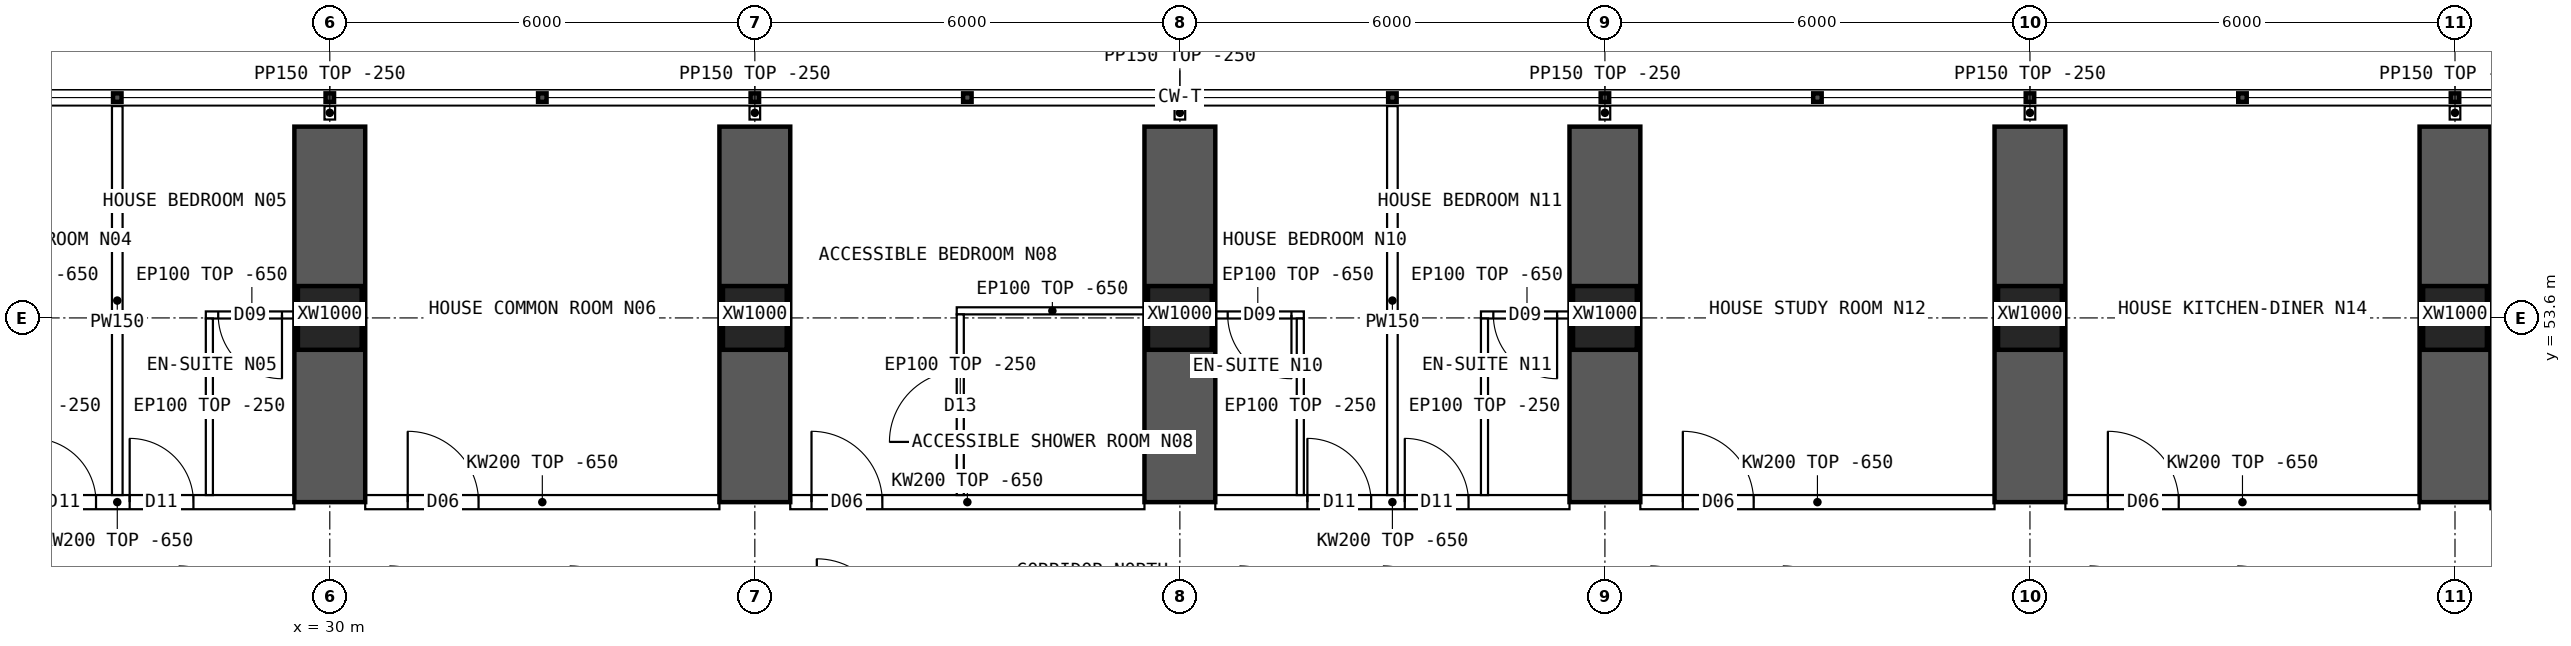
"""IFC4 building model, lengths in metres.
Left out: names, types, materials, properties, quantities, classifications, styles, units other than length and angle.
Written with IfcOpenShell. Run it as: python <this file> out.ifc"""

import sys

from ifc_helpers import new_model, si_unit, direction, frame, frame_2d, origin, origin_2d, place, context, subcontext, project, spatial, polyline, rectangle, hollow_rectangle, outline, extrude, element, fill, save


model = new_model("IFC4")
c1 = context("Model", 3, precision=1e-05, world=origin(), true_north=direction((0.0, 1.0)))
c2 = subcontext(c1, "Body", "Model", "MODEL_VIEW")
j1 = project(units=[si_unit("LENGTHUNIT", "METRE"), si_unit("PLANEANGLEUNIT", "RADIAN")], contexts=[c1])
p1 = place(None, origin())
s1 = spatial("IfcSite", under=j1, at=p1, CompositionType="ELEMENT")
p2 = place(p1, origin())
s2 = spatial("IfcBuilding", under=s1, at=p2, CompositionType="ELEMENT")
p3 = place(p2, frame((0.0, 0.0, 61.45)))
s3 = spatial("IfcBuildingStorey", under=s2, at=p3, CompositionType="ELEMENT", Elevation=61.45)
for number, where, z_axis, x_axis in (
    (1, (30.0, 53.6, 0.0), (0.0, 0.0, 1.0), (1.0, 0.0, 0.0)),
    (2, (36.0, 53.6, 0.0), (0.0, 0.0, 1.0), (1.0, 0.0, 0.0)),
    (3, (42.0, 53.6, 0.0), (0.0, 0.0, 1.0), (1.0, 0.0, 0.0)),
    (4, (48.0, 53.6, 0.0), (0.0, 0.0, 1.0), (1.0, 0.0, 0.0)),
    (5, (54.0, 53.6, 0.0), (0.0, 0.0, 1.0), (1.0, 0.0, 0.0)),
    (6, (60.0, 53.6, 0.0), (0.0, 0.0, 1.0), (1.0, 0.0, 0.0)),
):
    element("IfcColumn", number, at=place(p3, frame(where, z_axis=z_axis, x_axis=x_axis)), inside=s3, PredefinedType="COLUMN", context=c2, shape_type="SweptSolid", body=[
        extrude(hollow_rectangle(XDim=0.9, YDim=0.9, WallThickness=0.09, at=origin_2d()), origin(), (0.0, 0.0, 1.0), 3.75),
    ])
for number, where, z_axis, x_axis in (
    (7, (30.0, 51.0, 0.0), (0.0, 0.0, 1.0), (0.0, 1.0, 0.0)),
    (8, (36.0, 51.0, 0.0), (0.0, 0.0, 1.0), (0.0, 1.0, 0.0)),
    (9, (42.0, 51.0, 0.0), (0.0, 0.0, 1.0), (0.0, 1.0, 0.0)),
    (10, (48.0, 51.0, 0.0), (0.0, 0.0, 1.0), (0.0, 1.0, 0.0)),
    (11, (54.0, 51.0, 0.0), (0.0, 0.0, 1.0), (0.0, 1.0, 0.0)),
    (12, (60.0, 51.0, 0.0), (0.0, 0.0, 1.0), (0.0, 1.0, 0.0)),
):
    element("IfcWall", number, at=place(p3, frame(where, z_axis=z_axis, x_axis=x_axis)), inside=s3, PredefinedType="SHEAR", context=c2, shape_type="SweptSolid", body=[
        extrude(rectangle(XDim=5.3, YDim=1.0, at=frame_2d((2.65, 0.0))), origin(), (0.0, 0.0, 1.0), 3.75),
    ])
p4 = place(p3, frame((24.5, 51.0, 0.0), z_axis=(0.0, 0.0, 1.0), x_axis=(1.0, 0.0, 0.0)))
e13 = element("IfcWall", 13, at=p4, inside=s3, PredefinedType="SOLIDWALL", context=c2, shape_type="SweptSolid", body=[
    extrude(outline(polyline([(0.0, 0.0), (5.0, 0.0), (5.0, 3.1), (0.0, 3.1), (0.0, 0.0)])), frame((0.0, 0.1, 0.0), z_axis=(0.0, -1.0, 0.0), x_axis=(1.0, 0.0, 0.0)), (0.0, 0.0, 1.0), 0.2),
])
p5 = place(p4, frame((1.3, 0.0, 0.0)))
e14 = element("IfcOpeningElement", 14, at=p5, cuts=e13, PredefinedType="OPENING", context=c2, shape_type="SweptSolid", body=[
    extrude(rectangle(XDim=0.9, YDim=2.1, at=frame_2d((0.45, 1.05))), frame((0.0, 0.11, 0.0), z_axis=(0.0, -1.0, 0.0), x_axis=(1.0, 0.0, 0.0)), (0.0, 0.0, 1.0), 0.22),
])
p6 = place(p4, frame((2.675, 0.0, 0.0)))
e15 = element("IfcOpeningElement", 15, at=p6, cuts=e13, PredefinedType="OPENING", context=c2, shape_type="SweptSolid", body=[
    extrude(rectangle(XDim=0.9, YDim=2.1, at=frame_2d((0.45, 1.05))), frame((0.0, 0.11, 0.0), z_axis=(0.0, -1.0, 0.0), x_axis=(1.0, 0.0, 0.0)), (0.0, 0.0, 1.0), 0.22),
])
p7 = place(p3, frame((30.5, 51.0, 0.0), z_axis=(0.0, 0.0, 1.0), x_axis=(1.0, 0.0, 0.0)))
e16 = element("IfcWall", 16, at=p7, inside=s3, PredefinedType="SOLIDWALL", context=c2, shape_type="SweptSolid", body=[
    extrude(outline(polyline([(0.0, 0.0), (5.0, 0.0), (5.0, 3.1), (0.0, 3.1), (0.0, 0.0)])), frame((0.0, 0.1, 0.0), z_axis=(0.0, -1.0, 0.0), x_axis=(1.0, 0.0, 0.0)), (0.0, 0.0, 1.0), 0.2),
])
p8 = place(p7, frame((0.6, 0.0, 0.0)))
e17 = element("IfcOpeningElement", 17, at=p8, cuts=e16, PredefinedType="OPENING", context=c2, shape_type="SweptSolid", body=[
    extrude(rectangle(XDim=1.0, YDim=2.1, at=frame_2d((0.5, 1.05))), frame((0.0, 0.11, 0.0), z_axis=(0.0, -1.0, 0.0), x_axis=(1.0, 0.0, 0.0)), (0.0, 0.0, 1.0), 0.22),
])
p9 = place(p3, frame((36.5, 51.0, 0.0), z_axis=(0.0, 0.0, 1.0), x_axis=(1.0, 0.0, 0.0)))
e18 = element("IfcWall", 18, at=p9, inside=s3, PredefinedType="SOLIDWALL", context=c2, shape_type="SweptSolid", body=[
    extrude(outline(polyline([(0.0, 0.0), (5.0, 0.0), (5.0, 3.1), (0.0, 3.1), (0.0, 0.0)])), frame((0.0, 0.1, 0.0), z_axis=(0.0, -1.0, 0.0), x_axis=(1.0, 0.0, 0.0)), (0.0, 0.0, 1.0), 0.2),
])
p10 = place(p9, frame((0.3, 0.0, 0.0)))
e19 = element("IfcOpeningElement", 19, at=p10, cuts=e18, PredefinedType="OPENING", context=c2, shape_type="SweptSolid", body=[
    extrude(rectangle(XDim=1.0, YDim=2.1, at=frame_2d((0.5, 1.05))), frame((0.0, 0.11, 0.0), z_axis=(0.0, -1.0, 0.0), x_axis=(1.0, 0.0, 0.0)), (0.0, 0.0, 1.0), 0.22),
])
p11 = place(p3, frame((42.5, 51.0, 0.0), z_axis=(0.0, 0.0, 1.0), x_axis=(1.0, 0.0, 0.0)))
e20 = element("IfcWall", 20, at=p11, inside=s3, PredefinedType="SOLIDWALL", context=c2, shape_type="SweptSolid", body=[
    extrude(outline(polyline([(0.0, 0.0), (5.0, 0.0), (5.0, 3.1), (0.0, 3.1), (0.0, 0.0)])), frame((0.0, 0.1, 0.0), z_axis=(0.0, -1.0, 0.0), x_axis=(1.0, 0.0, 0.0)), (0.0, 0.0, 1.0), 0.2),
])
p12 = place(p11, frame((1.3, 0.0, 0.0)))
e21 = element("IfcOpeningElement", 21, at=p12, cuts=e20, PredefinedType="OPENING", context=c2, shape_type="SweptSolid", body=[
    extrude(rectangle(XDim=0.9, YDim=2.1, at=frame_2d((0.45, 1.05))), frame((0.0, 0.11, 0.0), z_axis=(0.0, -1.0, 0.0), x_axis=(1.0, 0.0, 0.0)), (0.0, 0.0, 1.0), 0.22),
])
p13 = place(p11, frame((2.675, 0.0, 0.0)))
e22 = element("IfcOpeningElement", 22, at=p13, cuts=e20, PredefinedType="OPENING", context=c2, shape_type="SweptSolid", body=[
    extrude(rectangle(XDim=0.9, YDim=2.1, at=frame_2d((0.45, 1.05))), frame((0.0, 0.11, 0.0), z_axis=(0.0, -1.0, 0.0), x_axis=(1.0, 0.0, 0.0)), (0.0, 0.0, 1.0), 0.22),
])
p14 = place(p3, frame((48.5, 51.0, 0.0), z_axis=(0.0, 0.0, 1.0), x_axis=(1.0, 0.0, 0.0)))
e23 = element("IfcWall", 23, at=p14, inside=s3, PredefinedType="SOLIDWALL", context=c2, shape_type="SweptSolid", body=[
    extrude(outline(polyline([(0.0, 0.0), (5.0, 0.0), (5.0, 3.1), (0.0, 3.1), (0.0, 0.0)])), frame((0.0, 0.1, 0.0), z_axis=(0.0, -1.0, 0.0), x_axis=(1.0, 0.0, 0.0)), (0.0, 0.0, 1.0), 0.2),
])
p15 = place(p14, frame((0.6, 0.0, 0.0)))
e24 = element("IfcOpeningElement", 24, at=p15, cuts=e23, PredefinedType="OPENING", context=c2, shape_type="SweptSolid", body=[
    extrude(rectangle(XDim=1.0, YDim=2.1, at=frame_2d((0.5, 1.05))), frame((0.0, 0.11, 0.0), z_axis=(0.0, -1.0, 0.0), x_axis=(1.0, 0.0, 0.0)), (0.0, 0.0, 1.0), 0.22),
])
p16 = place(p3, frame((54.5, 51.0, 0.0), z_axis=(0.0, 0.0, 1.0), x_axis=(1.0, 0.0, 0.0)))
e25 = element("IfcWall", 25, at=p16, inside=s3, PredefinedType="SOLIDWALL", context=c2, shape_type="SweptSolid", body=[
    extrude(outline(polyline([(0.0, 0.0), (5.0, 0.0), (5.0, 3.1), (0.0, 3.1), (0.0, 0.0)])), frame((0.0, 0.1, 0.0), z_axis=(0.0, -1.0, 0.0), x_axis=(1.0, 0.0, 0.0)), (0.0, 0.0, 1.0), 0.2),
])
p17 = place(p16, frame((0.6, 0.0, 0.0)))
e26 = element("IfcOpeningElement", 26, at=p17, cuts=e25, PredefinedType="OPENING", context=c2, shape_type="SweptSolid", body=[
    extrude(rectangle(XDim=1.0, YDim=2.1, at=frame_2d((0.5, 1.05))), frame((0.0, 0.11, 0.0), z_axis=(0.0, -1.0, 0.0), x_axis=(1.0, 0.0, 0.0)), (0.0, 0.0, 1.0), 0.22),
])
p18 = place(p3, frame((27.0, 56.59, 0.0), z_axis=(0.0, 0.0, 1.0), x_axis=(0.0, -1.0, 0.0)))
e27 = element("IfcWall", 27, at=p18, inside=s3, PredefinedType="PARTITIONING", context=c2, shape_type="SweptSolid", body=[
    extrude(outline(polyline([(0.0, 0.0), (5.49, 0.0), (5.49, 3.1), (5.442, 3.1), (5.44, 3.5), (3.192, 3.5), (3.19, 3.1), (2.792, 3.1), (2.79, 3.5), (0.0, 3.5), (0.0, 0.0)])), frame((0.0, 0.075, 0.0), z_axis=(0.0, -1.0, 0.0), x_axis=(1.0, 0.0, 0.0)), (0.0, 0.0, 1.0), 0.15),
])
p19 = place(p3, frame((28.25, 53.642, 0.0), z_axis=(0.0, 0.0, 1.0), x_axis=(1.0, 0.0, 0.0)))
e28 = element("IfcWall", 28, at=p19, inside=s3, PredefinedType="PARTITIONING", context=c2, shape_type="SweptSolid", body=[
    extrude(outline(polyline([(0.0, 0.0), (1.3, 0.0), (1.3, 3.1), (0.0, 3.1), (0.0, 0.0)])), frame((0.0, 0.05, 0.0), z_axis=(0.0, -1.0, 0.0), x_axis=(1.0, 0.0, 0.0)), (0.0, 0.0, 1.0), 0.1),
])
p20 = place(p19, frame((0.175, 0.0, 0.0)))
e29 = element("IfcOpeningElement", 29, at=p20, cuts=e28, PredefinedType="OPENING", context=c2, shape_type="SweptSolid", body=[
    extrude(rectangle(XDim=0.9, YDim=2.1, at=frame_2d((0.45, 1.05))), frame((0.0, 0.06, 0.0), z_axis=(0.0, -1.0, 0.0), x_axis=(1.0, 0.0, 0.0)), (0.0, 0.0, 1.0), 0.12),
])
p21 = place(p3, frame((28.3, 53.592, 0.0), z_axis=(0.0, 0.0, 1.0), x_axis=(0.0, -1.0, 0.0)))
e30 = element("IfcWall", 30, at=p21, inside=s3, PredefinedType="PARTITIONING", context=c2, shape_type="SweptSolid", body=[
    extrude(outline(polyline([(0.0, 0.0), (2.492, 0.0), (2.492, 3.1), (2.444, 3.1), (2.442, 3.5), (0.194, 3.5), (0.192, 3.1), (0.0, 3.1), (0.0, 0.0)])), frame((0.0, 0.05, 0.0), z_axis=(0.0, -1.0, 0.0), x_axis=(1.0, 0.0, 0.0)), (0.0, 0.0, 1.0), 0.1),
])
p22 = place(p3, frame((38.85, 53.7, 0.0), z_axis=(0.0, 0.0, 1.0), x_axis=(1.0, 0.0, 0.0)))
e31 = element("IfcWall", 31, at=p22, inside=s3, PredefinedType="PARTITIONING", context=c2, shape_type="SweptSolid", body=[
    extrude(outline(polyline([(0.0, 0.0), (2.7, 0.0), (2.7, 3.1), (0.0, 3.1), (0.0, 0.0)])), frame((0.0, 0.05, 0.0), z_axis=(0.0, -1.0, 0.0), x_axis=(1.0, 0.0, 0.0)), (0.0, 0.0, 1.0), 0.1),
])
p23 = place(p3, frame((38.9, 53.65, 0.0), z_axis=(0.0, 0.0, 1.0), x_axis=(0.0, -1.0, 0.0)))
e32 = element("IfcWall", 32, at=p23, inside=s3, PredefinedType="PARTITIONING", context=c2, shape_type="SweptSolid", body=[
    extrude(outline(polyline([(0.0, 0.0), (2.55, 0.0), (2.55, 3.1), (2.502, 3.1), (2.5, 3.5), (0.252, 3.5), (0.25, 3.1), (0.0, 3.1), (0.0, 0.0)])), frame((0.0, 0.05, 0.0), z_axis=(0.0, -1.0, 0.0), x_axis=(1.0, 0.0, 0.0)), (0.0, 0.0, 1.0), 0.1),
])
p24 = place(p23, frame((0.8, 0.0, 0.0)))
e33 = element("IfcOpeningElement", 33, at=p24, cuts=e32, PredefinedType="OPENING", context=c2, shape_type="SweptSolid", body=[
    extrude(rectangle(XDim=1.0, YDim=2.1, at=frame_2d((0.5, 1.05))), frame((0.0, 0.06, 0.0), z_axis=(0.0, -1.0, 0.0), x_axis=(1.0, 0.0, 0.0)), (0.0, 0.0, 1.0), 0.12),
])
p25 = place(p3, frame((45.0, 56.59, 0.0), z_axis=(0.0, 0.0, 1.0), x_axis=(0.0, -1.0, 0.0)))
e34 = element("IfcWall", 34, at=p25, inside=s3, PredefinedType="PARTITIONING", context=c2, shape_type="SweptSolid", body=[
    extrude(outline(polyline([(0.0, 0.0), (5.49, 0.0), (5.49, 3.1), (5.442, 3.1), (5.44, 3.5), (3.192, 3.5), (3.19, 3.1), (2.792, 3.1), (2.79, 3.5), (0.0, 3.5), (0.0, 0.0)])), frame((0.0, 0.075, 0.0), z_axis=(0.0, -1.0, 0.0), x_axis=(1.0, 0.0, 0.0)), (0.0, 0.0, 1.0), 0.15),
])
p26 = place(p3, frame((42.45, 53.642, 0.0), z_axis=(0.0, 0.0, 1.0), x_axis=(1.0, 0.0, 0.0)))
e35 = element("IfcWall", 35, at=p26, inside=s3, PredefinedType="PARTITIONING", context=c2, shape_type="SweptSolid", body=[
    extrude(outline(polyline([(0.0, 0.0), (1.3, 0.0), (1.3, 3.1), (0.0, 3.1), (0.0, 0.0)])), frame((0.0, 0.05, 0.0), z_axis=(0.0, -1.0, 0.0), x_axis=(1.0, 0.0, 0.0)), (0.0, 0.0, 1.0), 0.1),
])
p27 = place(p26, frame((0.225, 0.0, 0.0)))
e36 = element("IfcOpeningElement", 36, at=p27, cuts=e35, PredefinedType="OPENING", context=c2, shape_type="SweptSolid", body=[
    extrude(rectangle(XDim=0.9, YDim=2.1, at=frame_2d((0.45, 1.05))), frame((0.0, 0.06, 0.0), z_axis=(0.0, -1.0, 0.0), x_axis=(1.0, 0.0, 0.0)), (0.0, 0.0, 1.0), 0.12),
])
p28 = place(p3, frame((43.7, 53.592, 0.0), z_axis=(0.0, 0.0, 1.0), x_axis=(0.0, -1.0, 0.0)))
e37 = element("IfcWall", 37, at=p28, inside=s3, PredefinedType="PARTITIONING", context=c2, shape_type="SweptSolid", body=[
    extrude(outline(polyline([(0.0, 0.0), (2.492, 0.0), (2.492, 3.1), (2.444, 3.1), (2.442, 3.5), (0.194, 3.5), (0.192, 3.1), (0.0, 3.1), (0.0, 0.0)])), frame((0.0, 0.05, 0.0), z_axis=(0.0, -1.0, 0.0), x_axis=(1.0, 0.0, 0.0)), (0.0, 0.0, 1.0), 0.1),
])
p29 = place(p3, frame((46.25, 53.642, 0.0), z_axis=(0.0, 0.0, 1.0), x_axis=(1.0, 0.0, 0.0)))
e38 = element("IfcWall", 38, at=p29, inside=s3, PredefinedType="PARTITIONING", context=c2, shape_type="SweptSolid", body=[
    extrude(outline(polyline([(0.0, 0.0), (1.3, 0.0), (1.3, 3.1), (0.0, 3.1), (0.0, 0.0)])), frame((0.0, 0.05, 0.0), z_axis=(0.0, -1.0, 0.0), x_axis=(1.0, 0.0, 0.0)), (0.0, 0.0, 1.0), 0.1),
])
p30 = place(p29, frame((0.175, 0.0, 0.0)))
e39 = element("IfcOpeningElement", 39, at=p30, cuts=e38, PredefinedType="OPENING", context=c2, shape_type="SweptSolid", body=[
    extrude(rectangle(XDim=0.9, YDim=2.1, at=frame_2d((0.45, 1.05))), frame((0.0, 0.06, 0.0), z_axis=(0.0, -1.0, 0.0), x_axis=(1.0, 0.0, 0.0)), (0.0, 0.0, 1.0), 0.12),
])
p31 = place(p3, frame((46.3, 53.592, 0.0), z_axis=(0.0, 0.0, 1.0), x_axis=(0.0, -1.0, 0.0)))
e40 = element("IfcWall", 40, at=p31, inside=s3, PredefinedType="PARTITIONING", context=c2, shape_type="SweptSolid", body=[
    extrude(outline(polyline([(0.0, 0.0), (2.492, 0.0), (2.492, 3.1), (2.444, 3.1), (2.442, 3.5), (0.194, 3.5), (0.192, 3.1), (0.0, 3.1), (0.0, 0.0)])), frame((0.0, 0.05, 0.0), z_axis=(0.0, -1.0, 0.0), x_axis=(1.0, 0.0, 0.0)), (0.0, 0.0, 1.0), 0.1),
])
for number, where, z_axis, x_axis in (
    (41, (30.0, 56.4, 0.0), (0.0, 0.0, 1.0), (0.0, 1.0, 0.0)),
    (42, (36.0, 56.4, 0.0), (0.0, 0.0, 1.0), (0.0, 1.0, 0.0)),
    (43, (42.0, 56.4, 0.0), (0.0, 0.0, 1.0), (0.0, 1.0, 0.0)),
    (44, (48.0, 56.4, 0.0), (0.0, 0.0, 1.0), (0.0, 1.0, 0.0)),
    (45, (54.0, 56.4, 0.0), (0.0, 0.0, 1.0), (0.0, 1.0, 0.0)),
    (46, (60.0, 56.4, 0.0), (0.0, 0.0, 1.0), (0.0, 1.0, 0.0)),
):
    element("IfcWall", number, at=place(p3, frame(where, z_axis=z_axis, x_axis=x_axis)), inside=s3, PredefinedType="PARTITIONING", context=c2, shape_type="SweptSolid", body=[
        extrude(rectangle(XDim=0.19, YDim=0.15, at=frame_2d((0.095, 0.0))), origin(), (0.0, 0.0, 1.0), 3.5),
    ])
p32 = place(p5, origin())
e47 = element("IfcDoor", 47, at=p32, inside=s3, OperationType="SINGLE_SWING_LEFT", PredefinedType="DOOR", context=c2, shape_type="SweptSolid", body=[
    extrude(rectangle(XDim=0.9, YDim=2.1, at=frame_2d((0.45, 1.05))), frame((0.0, 0.025, 0.0), z_axis=(0.0, -1.0, 0.0), x_axis=(1.0, 0.0, 0.0)), (0.0, 0.0, 1.0), 0.05),
])
fill(e14, e47)
p33 = place(p20, origin())
e48 = element("IfcDoor", 48, at=p33, inside=s3, OperationType="SINGLE_SWING_RIGHT", PredefinedType="DOOR", context=c2, shape_type="SweptSolid", body=[
    extrude(rectangle(XDim=0.9, YDim=2.1, at=frame_2d((0.45, 1.05))), frame((0.0, 0.025, 0.0), z_axis=(0.0, -1.0, 0.0), x_axis=(1.0, 0.0, 0.0)), (0.0, 0.0, 1.0), 0.05),
])
fill(e29, e48)
p34 = place(p6, origin())
e49 = element("IfcDoor", 49, at=p34, inside=s3, OperationType="SINGLE_SWING_LEFT", PredefinedType="DOOR", context=c2, shape_type="SweptSolid", body=[
    extrude(rectangle(XDim=0.9, YDim=2.1, at=frame_2d((0.45, 1.05))), frame((0.0, 0.025, 0.0), z_axis=(0.0, -1.0, 0.0), x_axis=(1.0, 0.0, 0.0)), (0.0, 0.0, 1.0), 0.05),
])
fill(e15, e49)
p35 = place(p8, origin())
e50 = element("IfcDoor", 50, at=p35, inside=s3, OperationType="SINGLE_SWING_LEFT", PredefinedType="DOOR", context=c2, shape_type="SweptSolid", body=[
    extrude(rectangle(XDim=1.0, YDim=2.1, at=frame_2d((0.5, 1.05))), frame((0.0, 0.025, 0.0), z_axis=(0.0, -1.0, 0.0), x_axis=(1.0, 0.0, 0.0)), (0.0, 0.0, 1.0), 0.05),
])
fill(e17, e50)
p36 = place(p24, origin())
e51 = element("IfcDoor", 51, at=p36, inside=s3, OperationType="SINGLE_SWING_RIGHT", PredefinedType="DOOR", context=c2, shape_type="SweptSolid", body=[
    extrude(rectangle(XDim=1.0, YDim=2.1, at=frame_2d((0.5, 1.05))), frame((0.0, 0.025, 0.0), z_axis=(0.0, -1.0, 0.0), x_axis=(1.0, 0.0, 0.0)), (0.0, 0.0, 1.0), 0.05),
])
fill(e33, e51)
p37 = place(p10, origin())
e52 = element("IfcDoor", 52, at=p37, inside=s3, OperationType="SINGLE_SWING_LEFT", PredefinedType="DOOR", context=c2, shape_type="SweptSolid", body=[
    extrude(rectangle(XDim=1.0, YDim=2.1, at=frame_2d((0.5, 1.05))), frame((0.0, 0.025, 0.0), z_axis=(0.0, -1.0, 0.0), x_axis=(1.0, 0.0, 0.0)), (0.0, 0.0, 1.0), 0.05),
])
fill(e19, e52)
p38 = place(p27, origin())
e53 = element("IfcDoor", 53, at=p38, inside=s3, OperationType="SINGLE_SWING_RIGHT", PredefinedType="DOOR", context=c2, shape_type="SweptSolid", body=[
    extrude(rectangle(XDim=0.9, YDim=2.1, at=frame_2d((0.45, 1.05))), frame((0.0, 0.025, 0.0), z_axis=(0.0, -1.0, 0.0), x_axis=(1.0, 0.0, 0.0)), (0.0, 0.0, 1.0), 0.05),
])
fill(e36, e53)
p39 = place(p12, origin())
e54 = element("IfcDoor", 54, at=p39, inside=s3, OperationType="SINGLE_SWING_LEFT", PredefinedType="DOOR", context=c2, shape_type="SweptSolid", body=[
    extrude(rectangle(XDim=0.9, YDim=2.1, at=frame_2d((0.45, 1.05))), frame((0.0, 0.025, 0.0), z_axis=(0.0, -1.0, 0.0), x_axis=(1.0, 0.0, 0.0)), (0.0, 0.0, 1.0), 0.05),
])
fill(e21, e54)
p40 = place(p30, origin())
e55 = element("IfcDoor", 55, at=p40, inside=s3, OperationType="SINGLE_SWING_RIGHT", PredefinedType="DOOR", context=c2, shape_type="SweptSolid", body=[
    extrude(rectangle(XDim=0.9, YDim=2.1, at=frame_2d((0.45, 1.05))), frame((0.0, 0.025, 0.0), z_axis=(0.0, -1.0, 0.0), x_axis=(1.0, 0.0, 0.0)), (0.0, 0.0, 1.0), 0.05),
])
fill(e39, e55)
p41 = place(p13, origin())
e56 = element("IfcDoor", 56, at=p41, inside=s3, OperationType="SINGLE_SWING_LEFT", PredefinedType="DOOR", context=c2, shape_type="SweptSolid", body=[
    extrude(rectangle(XDim=0.9, YDim=2.1, at=frame_2d((0.45, 1.05))), frame((0.0, 0.025, 0.0), z_axis=(0.0, -1.0, 0.0), x_axis=(1.0, 0.0, 0.0)), (0.0, 0.0, 1.0), 0.05),
])
fill(e22, e56)
p42 = place(p15, origin())
e57 = element("IfcDoor", 57, at=p42, inside=s3, OperationType="SINGLE_SWING_LEFT", PredefinedType="DOOR", context=c2, shape_type="SweptSolid", body=[
    extrude(rectangle(XDim=1.0, YDim=2.1, at=frame_2d((0.5, 1.05))), frame((0.0, 0.025, 0.0), z_axis=(0.0, -1.0, 0.0), x_axis=(1.0, 0.0, 0.0)), (0.0, 0.0, 1.0), 0.05),
])
fill(e24, e57)
p43 = place(p17, origin())
e58 = element("IfcDoor", 58, at=p43, inside=s3, OperationType="SINGLE_SWING_LEFT", PredefinedType="DOOR", context=c2, shape_type="SweptSolid", body=[
    extrude(rectangle(XDim=1.0, YDim=2.1, at=frame_2d((0.5, 1.05))), frame((0.0, 0.025, 0.0), z_axis=(0.0, -1.0, 0.0), x_axis=(1.0, 0.0, 0.0)), (0.0, 0.0, 1.0), 0.05),
])
fill(e26, e58)
save(model, sys.argv[1])
